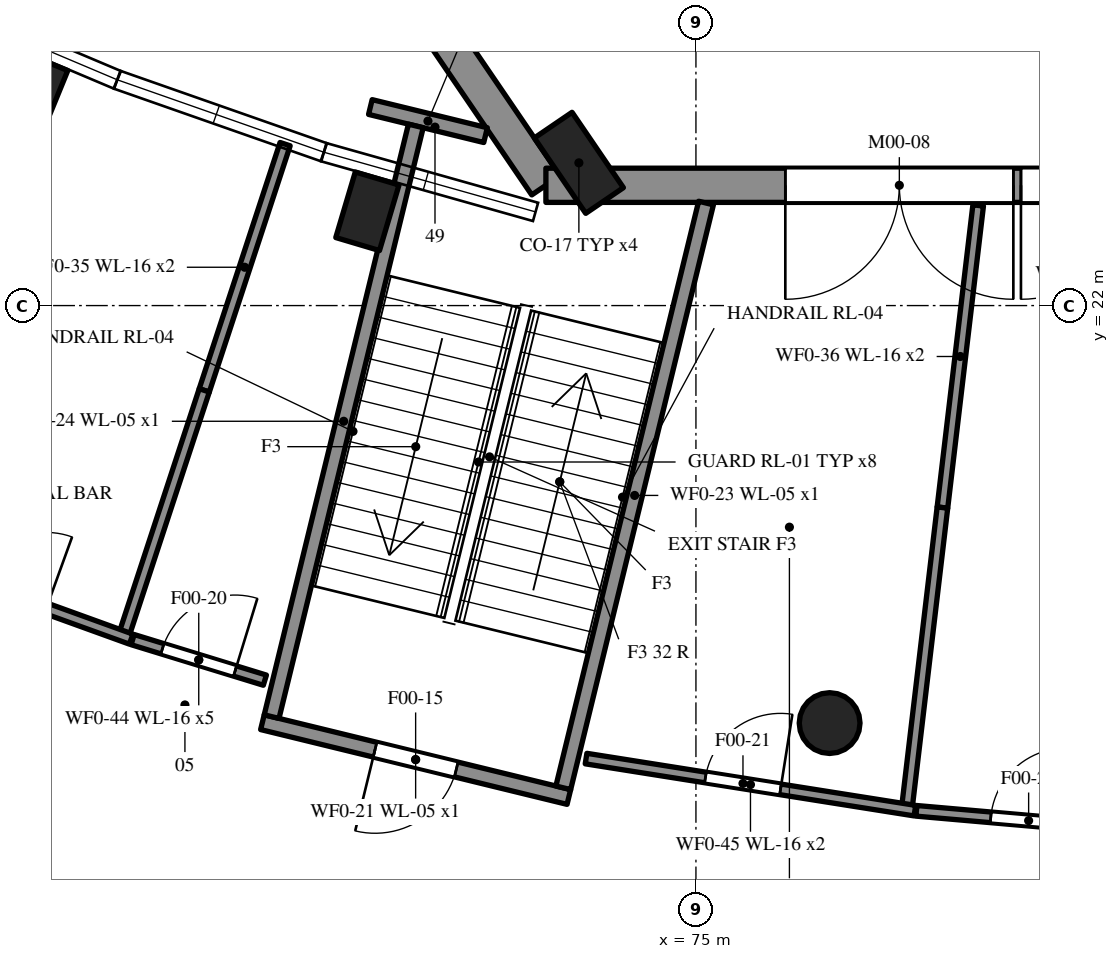
"""IFC4 building model, lengths in metres.
Left out: names, types, materials, properties, quantities, classifications, styles, units other than length and angle.
Written with IfcOpenShell. Run it as: python <this file> out.ifc"""

import sys

from ifc_helpers import new_model, si_unit, direction, frame, frame_2d, origin, origin_2d, place, context, subcontext, project, spatial, rectangle, circle, extrude, element, fill, save


model = new_model("IFC4")
c1 = context("Model", 3, precision=1e-05, world=origin(), true_north=direction((0.0, 1.0)))
c2 = subcontext(c1, "Body", "Model", "MODEL_VIEW")
j1 = project(units=[si_unit("LENGTHUNIT", "METRE"), si_unit("PLANEANGLEUNIT", "RADIAN")], contexts=[c1])
p1 = place(None, origin())
s1 = spatial("IfcSite", under=j1, at=p1, CompositionType="ELEMENT")
p2 = place(p1, origin())
s2 = spatial("IfcBuilding", under=s1, at=p2, CompositionType="ELEMENT")
p3 = place(p2, origin())
s3 = spatial("IfcBuildingStorey", under=s2, at=p3, CompositionType="ELEMENT", Elevation=0.0)
p4 = place(p3, frame((71.389, 25.986, 0.0), z_axis=(0.0, 0.0, 1.0), x_axis=(0.5629642644, -0.826481238147, 0.0)))
e1 = element("IfcWall", 1, at=p4, inside=s3, PredefinedType="SOLIDWALL", context=c2, shape_type="SweptSolid", body=[
    extrude(rectangle(XDim=2.908, YDim=0.45, at=frame_2d((1.454, 0.0))), origin(), (0.0, 0.0, 1.0), 5.4),
])
p5 = place(p3, frame((73.026, 23.583, 0.0), z_axis=(0.0, 0.0, 1.0), x_axis=(1.0, 0.0, 0.0)))
e2 = element("IfcWall", 2, at=p5, inside=s3, PredefinedType="SOLIDWALL", context=c2, shape_type="SweptSolid", body=[
    extrude(rectangle(XDim=21.948, YDim=0.45, at=frame_2d((10.974, 0.0))), origin(), (0.0, 0.0, 1.0), 5.4),
])
p6 = place(p5, frame((3.15, 0.0, 0.0)))
e3 = element("IfcOpeningElement", 3, at=p6, cuts=e2, PredefinedType="OPENING", context=c2, shape_type="SweptSolid", body=[
    extrude(rectangle(XDim=3.0, YDim=3.0, at=frame_2d((1.5, 1.5))), frame((0.0, 0.235, 0.0), z_axis=(0.0, -1.0, 0.0), x_axis=(1.0, 0.0, 0.0)), (0.0, 0.0, 1.0), 0.47),
])
p7 = place(p5, frame((6.25, 0.0, 0.0)))
e4 = element("IfcOpeningElement", 4, at=p7, cuts=e2, PredefinedType="OPENING", context=c2, shape_type="SweptSolid", body=[
    extrude(rectangle(XDim=3.0, YDim=3.0, at=frame_2d((1.5, 1.5))), frame((0.0, 0.235, 0.0), z_axis=(0.0, -1.0, 0.0), x_axis=(1.0, 0.0, 0.0)), (0.0, 0.0, 1.0), 0.47),
])
p8 = place(p5, frame((16.2, 0.0, 0.0)))
e5 = element("IfcOpeningElement", 5, at=p8, cuts=e2, PredefinedType="OPENING", context=c2, shape_type="SweptSolid", body=[
    extrude(rectangle(XDim=3.0, YDim=3.0, at=frame_2d((1.5, 1.5))), frame((0.0, 0.235, 0.0), z_axis=(0.0, -1.0, 0.0), x_axis=(1.0, 0.0, 0.0)), (0.0, 0.0, 1.0), 0.47),
])
p9 = place(p3, frame((73.46, 23.878, 0.0), z_axis=(0.0, 0.0, 1.0), x_axis=(0.562978035902, -0.82647185741, 0.0)))
e6 = element("IfcColumn", 6, at=p9, inside=s3, PredefinedType="PILASTER", context=c2, shape_type="SweptSolid", body=[
    extrude(rectangle(XDim=1.2, YDim=0.6, at=origin_2d()), origin(), (0.0, 0.0, 1.0), 5.4),
])
for number, where, z_axis, x_axis in (
    (7, (66.287, 24.79, 0.0), (0.0, 0.0, 1.0), (-0.379, -0.925, 0.0)),
    (8, (70.677, 23.241, 0.0), (0.0, 0.0, 1.0), (-0.285, -0.958, 0.0)),
):
    element("IfcColumn", number, at=place(p3, frame(where, z_axis=z_axis, x_axis=x_axis)), inside=s3, PredefinedType="PILASTER", context=c2, shape_type="SweptSolid", body=[
        extrude(rectangle(XDim=0.9, YDim=0.6, at=origin_2d()), origin(), (0.0, 0.0, 1.0), 5.4),
    ])
p10 = place(p3, frame((76.759, 16.507, 0.0), z_axis=(0.0, 0.0, 1.0), x_axis=(1.0, 0.0, 0.0)))
e9 = element("IfcColumn", 9, at=p10, inside=s3, PredefinedType="COLUMN", context=c2, shape_type="SweptSolid", body=[
    extrude(circle(Radius=0.4, at=origin_2d()), origin(), (0.0, 0.0, 1.0), 5.4),
])
p11 = place(p3, frame((73.328, 15.534, 0.0), z_axis=(0.0, 0.0, 1.0), x_axis=(-0.97147374422, 0.237147136374, 0.0)))
e10 = element("IfcWall", 10, at=p11, inside=s3, PredefinedType="SHEAR", context=c2, shape_type="SweptSolid", body=[
    extrude(rectangle(XDim=4.15, YDim=0.2, at=frame_2d((2.075, 0.0))), origin(), (0.0, 0.0, 1.0), 5.4),
])
p12 = place(p11, frame((1.525, 0.0, 0.0)))
e11 = element("IfcOpeningElement", 11, at=p12, cuts=e10, PredefinedType="OPENING", context=c2, shape_type="SweptSolid", body=[
    extrude(rectangle(XDim=1.1, YDim=2.1, at=frame_2d((0.55, 1.05))), frame((0.0, 0.11, 0.0), z_axis=(0.0, -1.0, 0.0), x_axis=(1.0, 0.0, 0.0)), (0.0, 0.0, 1.0), 0.22),
])
p13 = place(p3, frame((72.232, 24.242, 0.0), z_axis=(0.0, 0.0, 1.0), x_axis=(-0.971444715638, 0.237266020446, 0.0)))
e12 = element("IfcWall", 12, at=p13, inside=s3, PredefinedType="SHEAR", context=c2, shape_type="SweptSolid", body=[
    extrude(rectangle(XDim=1.56, YDim=0.2, at=frame_2d((0.78, 0.0))), origin(), (0.0, 0.0, 1.0), 5.4),
])
p14 = place(p3, frame((73.255, 15.655, 0.0), z_axis=(0.0, 0.0, 1.0), x_axis=(0.237142809453, 0.971474800458, 0.0)))
e13 = element("IfcWall", 13, at=p14, inside=s3, PredefinedType="SHEAR", context=c2, shape_type="SweptSolid", body=[
    extrude(rectangle(XDim=7.92, YDim=0.2, at=frame_2d((3.96, 0.0))), origin(), (0.0, 0.0, 1.0), 5.4),
])
p15 = place(p3, frame((69.417, 16.592, 0.0), z_axis=(0.0, 0.0, 1.0), x_axis=(0.2371535898, 0.971472168847, 0.0)))
e14 = element("IfcWall", 14, at=p15, inside=s3, PredefinedType="SHEAR", context=c2, shape_type="SweptSolid", body=[
    extrude(rectangle(XDim=8.0, YDim=0.2, at=frame_2d((4.0, 0.0))), origin(), (0.0, 0.0, 1.0), 5.4),
])
p16 = place(p3, frame((69.595, 24.124, 0.0), z_axis=(0.0, 0.0, 1.0), x_axis=(-0.311928968211, -0.950105425093, 0.0)))
e15 = element("IfcWall", 15, at=p16, inside=s3, PredefinedType="PARTITIONING", context=c2, shape_type="SweptSolid", body=[
    extrude(rectangle(XDim=3.41, YDim=0.14, at=frame_2d((1.705, 0.0))), origin(), (0.0, 0.0, 1.0), 5.18),
])
p17 = place(p3, frame((68.531, 20.884, 0.0), z_axis=(0.0, 0.0, 1.0), x_axis=(-0.311917422886, -0.950109215459, 0.0)))
e16 = element("IfcWall", 16, at=p17, inside=s3, PredefinedType="PARTITIONING", context=c2, shape_type="SweptSolid", body=[
    extrude(rectangle(XDim=3.35, YDim=0.14, at=frame_2d((1.675, 0.0))), origin(), (0.0, 0.0, 1.0), 5.18),
])
p18 = place(p3, frame((78.713, 23.318, 0.0), z_axis=(0.0, 0.0, 1.0), x_axis=(-0.117524162316, -0.993070023348, 0.0)))
e17 = element("IfcWall", 17, at=p18, inside=s3, PredefinedType="PARTITIONING", context=c2, shape_type="SweptSolid", body=[
    extrude(rectangle(XDim=4.003, YDim=0.14, at=frame_2d((2.001, 0.0))), origin(), (0.0, 0.0, 1.0), 5.18),
])
p19 = place(p3, frame((78.243, 19.342, 0.0), z_axis=(0.0, 0.0, 1.0), x_axis=(-0.117462752038, -0.993077288978, 0.0)))
e18 = element("IfcWall", 18, at=p19, inside=s3, PredefinedType="PARTITIONING", context=c2, shape_type="SweptSolid", body=[
    extrude(rectangle(XDim=3.943, YDim=0.14, at=frame_2d((1.971, 0.0))), origin(), (0.0, 0.0, 1.0), 5.18),
])
p20 = place(p3, frame((64.395, 18.76, 0.0), z_axis=(0.0, 0.0, 1.0), x_axis=(0.940374749463, -0.340140163128, 0.0)))
e19 = element("IfcWall", 19, at=p20, inside=s3, PredefinedType="PARTITIONING", context=c2, shape_type="SweptSolid", body=[
    extrude(rectangle(XDim=3.376, YDim=0.14, at=frame_2d((1.688, 0.0))), origin(), (0.0, 0.0, 1.0), 5.18),
])
p21 = place(p20, frame((1.188, 0.0, 0.0)))
e20 = element("IfcOpeningElement", 20, at=p21, cuts=e19, PredefinedType="OPENING", context=c2, shape_type="SweptSolid", body=[
    extrude(rectangle(XDim=1.0, YDim=2.1, at=frame_2d((0.5, 1.05))), frame((0.0, 0.08, 0.0), z_axis=(0.0, -1.0, 0.0), x_axis=(1.0, 0.0, 0.0)), (0.0, 0.0, 1.0), 0.16),
])
p22 = place(p3, frame((67.589, 17.605, 0.0), z_axis=(0.0, 0.0, 1.0), x_axis=(0.956028130963, -0.293274978148, 0.0)))
e21 = element("IfcWall", 21, at=p22, inside=s3, PredefinedType="PARTITIONING", context=c2, shape_type="SweptSolid", body=[
    extrude(rectangle(XDim=1.82, YDim=0.14, at=frame_2d((0.91, 0.0))), origin(), (0.0, 0.0, 1.0), 5.18),
])
p23 = place(p22, frame((0.41, 0.0, 0.0)))
e22 = element("IfcOpeningElement", 22, at=p23, cuts=e21, PredefinedType="OPENING", context=c2, shape_type="SweptSolid", body=[
    extrude(rectangle(XDim=1.0, YDim=2.1, at=frame_2d((0.5, 1.05))), frame((0.0, 0.08, 0.0), z_axis=(0.0, -1.0, 0.0), x_axis=(1.0, 0.0, 0.0)), (0.0, 0.0, 1.0), 0.16),
])
p24 = place(p3, frame((73.554, 16.04, 0.0), z_axis=(0.0, 0.0, 1.0), x_axis=(0.987693268679, -0.156403347173, 0.0)))
e23 = element("IfcWall", 23, at=p24, inside=s3, PredefinedType="PARTITIONING", context=c2, shape_type="SweptSolid", body=[
    extrude(rectangle(XDim=4.38, YDim=0.14, at=frame_2d((2.19, 0.0))), origin(), (0.0, 0.0, 1.0), 5.18),
])
p25 = place(p24, frame((1.59, 0.0, 0.0)))
e24 = element("IfcOpeningElement", 24, at=p25, cuts=e23, PredefinedType="OPENING", context=c2, shape_type="SweptSolid", body=[
    extrude(rectangle(XDim=1.0, YDim=2.1, at=frame_2d((0.5, 1.05))), frame((0.0, 0.08, 0.0), z_axis=(0.0, -1.0, 0.0), x_axis=(1.0, 0.0, 0.0)), (0.0, 0.0, 1.0), 0.16),
])
p26 = place(p3, frame((77.9, 15.352, 0.0), z_axis=(0.0, 0.0, 1.0), x_axis=(0.996183521579, -0.087283396667, 0.0)))
e25 = element("IfcWall", 25, at=p26, inside=s3, PredefinedType="PARTITIONING", context=c2, shape_type="SweptSolid", body=[
    extrude(rectangle(XDim=2.965, YDim=0.14, at=frame_2d((1.482, 0.0))), origin(), (0.0, 0.0, 1.0), 5.18),
])
p27 = place(p26, frame((0.982, 0.0, 0.0)))
e26 = element("IfcOpeningElement", 26, at=p27, cuts=e25, PredefinedType="OPENING", context=c2, shape_type="SweptSolid", body=[
    extrude(rectangle(XDim=1.0, YDim=2.1, at=frame_2d((0.5, 1.05))), frame((0.0, 0.08, 0.0), z_axis=(0.0, -1.0, 0.0), x_axis=(1.0, 0.0, 0.0)), (0.0, 0.0, 1.0), 0.16),
])
p28 = place(p6, frame((3.0, 0.0, 0.0), z_axis=(0.0, 0.0, 1.0), x_axis=(-1.0, 0.0, 0.0)))
e27 = element("IfcDoor", 27, at=p28, inside=s3, OperationType="DOUBLE_DOOR_SINGLE_SWING", PredefinedType="DOOR", context=c2, shape_type="SweptSolid", body=[
    extrude(rectangle(XDim=3.0, YDim=3.0, at=frame_2d((1.5, 1.5))), frame((0.0, 0.025, 0.0), z_axis=(0.0, -1.0, 0.0), x_axis=(1.0, 0.0, 0.0)), (0.0, 0.0, 1.0), 0.05),
])
fill(e3, e27)
p29 = place(p7, frame((3.0, 0.0, 0.0), z_axis=(0.0, 0.0, 1.0), x_axis=(-1.0, 0.0, 0.0)))
e28 = element("IfcDoor", 28, at=p29, inside=s3, OperationType="DOUBLE_DOOR_SINGLE_SWING", PredefinedType="DOOR", context=c2, shape_type="SweptSolid", body=[
    extrude(rectangle(XDim=3.0, YDim=3.0, at=frame_2d((1.5, 1.5))), frame((0.0, 0.025, 0.0), z_axis=(0.0, -1.0, 0.0), x_axis=(1.0, 0.0, 0.0)), (0.0, 0.0, 1.0), 0.05),
])
fill(e4, e28)
p30 = place(p12, origin())
e29 = element("IfcDoor", 29, at=p30, inside=s3, OperationType="SINGLE_SWING_RIGHT", PredefinedType="DOOR", context=c2, shape_type="SweptSolid", body=[
    extrude(rectangle(XDim=1.1, YDim=2.1, at=frame_2d((0.55, 1.05))), frame((0.0, 0.025, 0.0), z_axis=(0.0, -1.0, 0.0), x_axis=(1.0, 0.0, 0.0)), (0.0, 0.0, 1.0), 0.05),
])
fill(e11, e29)
p31 = place(p23, origin())
e30 = element("IfcDoor", 30, at=p31, inside=s3, OperationType="SINGLE_SWING_RIGHT", PredefinedType="DOOR", context=c2, shape_type="SweptSolid", body=[
    extrude(rectangle(XDim=1.0, YDim=2.1, at=frame_2d((0.5, 1.05))), frame((0.0, 0.025, 0.0), z_axis=(0.0, -1.0, 0.0), x_axis=(1.0, 0.0, 0.0)), (0.0, 0.0, 1.0), 0.05),
])
fill(e22, e30)
p32 = place(p25, origin())
e31 = element("IfcDoor", 31, at=p32, inside=s3, OperationType="SINGLE_SWING_RIGHT", PredefinedType="DOOR", context=c2, shape_type="SweptSolid", body=[
    extrude(rectangle(XDim=1.0, YDim=2.1, at=frame_2d((0.5, 1.05))), frame((0.0, 0.025, 0.0), z_axis=(0.0, -1.0, 0.0), x_axis=(1.0, 0.0, 0.0)), (0.0, 0.0, 1.0), 0.05),
])
fill(e24, e31)
p33 = place(p27, origin())
e32 = element("IfcDoor", 32, at=p33, inside=s3, OperationType="SINGLE_SWING_RIGHT", PredefinedType="DOOR", context=c2, shape_type="SweptSolid", body=[
    extrude(rectangle(XDim=1.0, YDim=2.1, at=frame_2d((0.5, 1.05))), frame((0.0, 0.025, 0.0), z_axis=(0.0, -1.0, 0.0), x_axis=(1.0, 0.0, 0.0)), (0.0, 0.0, 1.0), 0.05),
])
fill(e26, e32)
save(model, sys.argv[1])
